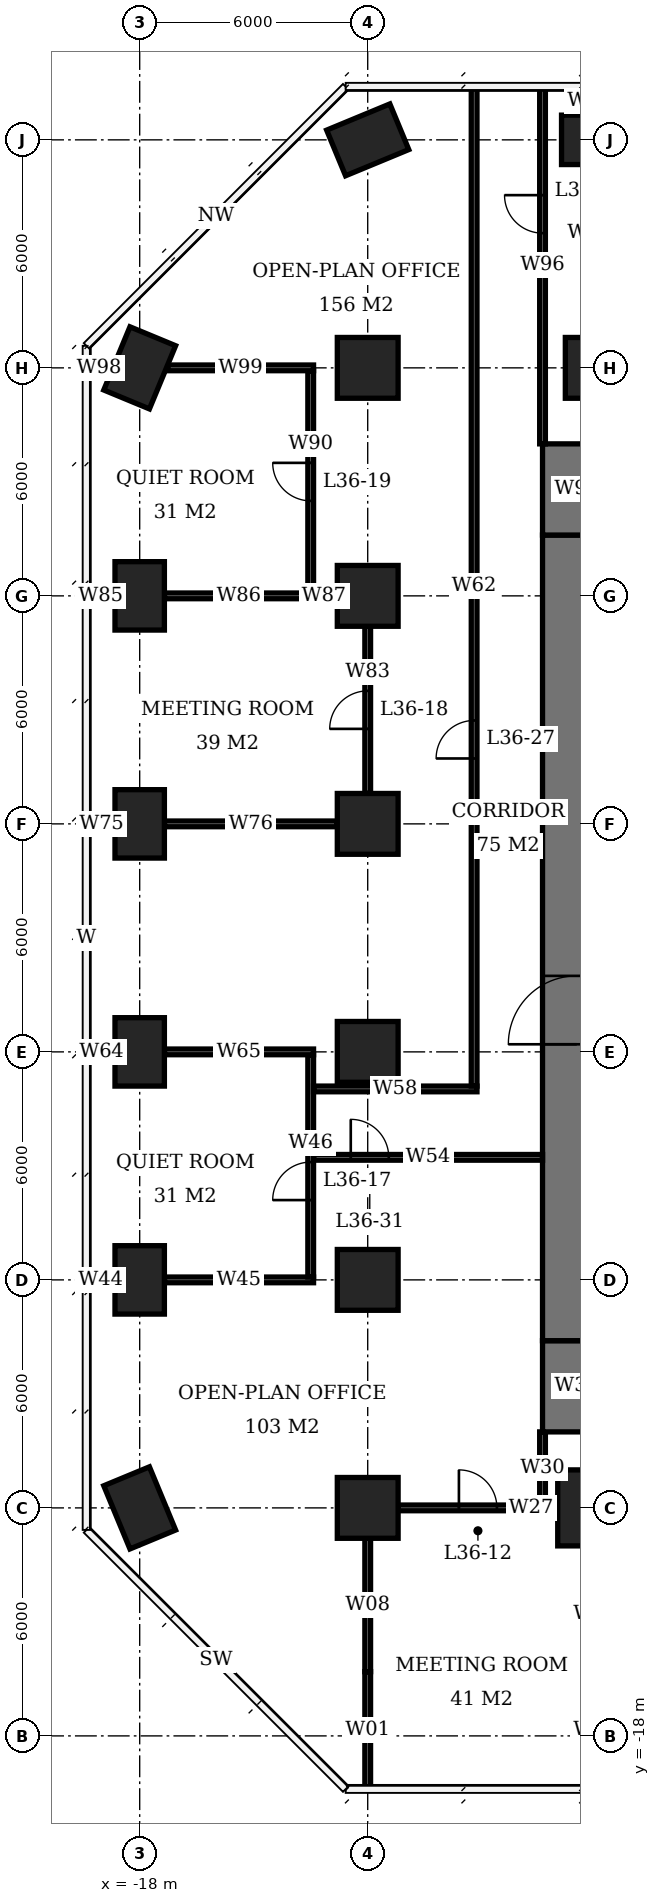
"""IFC4 building model, lengths in metres.
Left out: names, types, materials, properties, quantities, classifications, styles, units other than length and angle.
Written with IfcOpenShell. Run it as: python <this file> out.ifc"""

import sys

from ifc_helpers import new_model, si_unit, direction, frame, frame_2d, origin, origin_2d, place, context, subcontext, project, spatial, rectangle, extrude, element, fill, save


model = new_model("IFC4")
c1 = context("Model", 3, precision=1e-05, world=origin(), true_north=direction((0.0, 1.0)))
c2 = subcontext(c1, "Body", "Model", "MODEL_VIEW")
j1 = project(units=[si_unit("LENGTHUNIT", "METRE"), si_unit("PLANEANGLEUNIT", "RADIAN")], contexts=[c1])
p1 = place(None, origin())
s1 = spatial("IfcSite", under=j1, at=p1, CompositionType="ELEMENT")
p2 = place(p1, origin())
s2 = spatial("IfcBuilding", under=s1, at=p2, CompositionType="ELEMENT")
p3 = place(p2, frame((0.0, 0.0, 148.4)))
s3 = spatial("IfcBuildingStorey", under=s2, at=p3, CompositionType="ELEMENT", Elevation=148.4)
for number, where, z_axis, x_axis in (
    (1, (-18.0, -12.0, 0.0), (0.0, 0.0, 1.0), (-0.383, 0.924, 0.0)),
    (2, (-18.0, -6.0, 0.0), (0.0, 0.0, 1.0), (0.0, 1.0, 0.0)),
    (3, (-18.0, 0.0, 0.0), (0.0, 0.0, 1.0), (0.0, 1.0, 0.0)),
    (4, (-18.0, 6.0, 0.0), (0.0, 0.0, 1.0), (0.0, 1.0, 0.0)),
    (5, (-18.0, 12.0, 0.0), (0.0, 0.0, 1.0), (0.0, 1.0, 0.0)),
    (6, (-18.0, 18.0, 0.0), (0.0, 0.0, 1.0), (0.383, 0.924, 0.0)),
):
    element("IfcColumn", number, at=place(p3, frame(where, z_axis=z_axis, x_axis=x_axis)), inside=s3, PredefinedType="COLUMN", context=c2, shape_type="SweptSolid", body=[
        extrude(rectangle(XDim=1.8, YDim=1.3, at=origin_2d()), origin(), (0.0, 0.0, 1.0), 3.9),
    ])
for number, where, z_axis, x_axis in (
    (7, (-12.0, -12.0, 0.0), (0.0, 0.0, 1.0), (1.0, 0.0, 0.0)),
    (8, (-12.0, -6.0, 0.0), (0.0, 0.0, 1.0), (1.0, 0.0, 0.0)),
    (9, (-12.0, 0.0, 0.0), (0.0, 0.0, 1.0), (1.0, 0.0, 0.0)),
    (10, (-12.0, 6.0, 0.0), (0.0, 0.0, 1.0), (1.0, 0.0, 0.0)),
    (11, (-12.0, 12.0, 0.0), (0.0, 0.0, 1.0), (1.0, 0.0, 0.0)),
    (12, (-12.0, 18.0, 0.0), (0.0, 0.0, 1.0), (1.0, 0.0, 0.0)),
):
    element("IfcColumn", number, at=place(p3, frame(where, z_axis=z_axis, x_axis=x_axis)), inside=s3, PredefinedType="COLUMN", context=c2, shape_type="SweptSolid", body=[
        extrude(rectangle(XDim=1.6, YDim=1.6, at=origin_2d()), origin(), (0.0, 0.0, 1.0), 3.9),
    ])
p4 = place(p3, frame((-12.0, 24.0, 0.0), z_axis=(0.0, 0.0, 1.0), x_axis=(0.923879532511, 0.382683432365, 0.0)))
e13 = element("IfcColumn", 13, at=p4, inside=s3, PredefinedType="COLUMN", context=c2, shape_type="SweptSolid", body=[
    extrude(rectangle(XDim=1.8, YDim=1.3, at=origin_2d()), origin(), (0.0, 0.0, 1.0), 3.9),
])
p5 = place(p3, frame((-6.0, -12.0, 0.0), z_axis=(0.0, 0.0, 1.0), x_axis=(1.0, 0.0, 0.0)))
e14 = element("IfcColumn", 14, at=p5, inside=s3, PredefinedType="COLUMN", context=c2, shape_type="SweptSolid", body=[
    extrude(rectangle(XDim=2.0, YDim=2.0, at=origin_2d()), origin(), (0.0, 0.0, 1.0), 3.9),
])
p6 = place(p3, frame((-6.0, 18.0, 0.0), z_axis=(0.0, 0.0, 1.0), x_axis=(1.0, 0.0, 0.0)))
e15 = element("IfcColumn", 15, at=p6, inside=s3, PredefinedType="COLUMN", context=c2, shape_type="SweptSolid", body=[
    extrude(rectangle(XDim=1.6, YDim=1.6, at=origin_2d()), origin(), (0.0, 0.0, 1.0), 3.9),
])
p7 = place(p3, frame((-6.0, 24.0, 0.0), z_axis=(0.0, 0.0, 1.0), x_axis=(1.0, 0.0, 0.0)))
e16 = element("IfcColumn", 16, at=p7, inside=s3, PredefinedType="COLUMN", context=c2, shape_type="SweptSolid", body=[
    extrude(rectangle(XDim=1.8, YDim=1.3, at=origin_2d()), origin(), (0.0, 0.0, 1.0), 3.9),
])
p8 = place(p3, frame((-6.5, -7.6, 0.0), z_axis=(0.0, 0.0, 1.0), x_axis=(0.0, 1.0, 0.0)))
e17 = element("IfcWall", 17, at=p8, inside=s3, PredefinedType="SHEAR", context=c2, shape_type="SweptSolid", body=[
    extrude(rectangle(XDim=21.2, YDim=1.8, at=frame_2d((10.6, 0.0))), origin(), (0.0, 0.0, 1.0), 3.9),
])
p9 = place(p8, frame((7.8, 0.0, 0.0)))
e18 = element("IfcOpeningElement", 18, at=p9, cuts=e17, PredefinedType="OPENING", context=c2, shape_type="SweptSolid", body=[
    extrude(rectangle(XDim=1.8, YDim=2.4, at=frame_2d((0.9, 1.2))), frame((0.0, 0.91, 0.0), z_axis=(0.0, -1.0, 0.0), x_axis=(1.0, 0.0, 0.0)), (0.0, 0.0, 1.0), 1.82),
])
for number, where, z_axis, x_axis in (
    (19, (-6.5, -10.0, 0.0), (0.0, 0.0, 1.0), (0.0, 1.0, 0.0)),
    (20, (-6.5, 13.6, 0.0), (0.0, 0.0, 1.0), (0.0, 1.0, 0.0)),
):
    element("IfcWall", number, at=place(p3, frame(where, z_axis=z_axis, x_axis=x_axis)), inside=s3, PredefinedType="SHEAR", context=c2, shape_type="SweptSolid", body=[
        extrude(rectangle(XDim=2.4, YDim=1.8, at=frame_2d((1.2, 0.0))), origin(), (0.0, 0.0, 1.0), 3.9),
    ])
p10 = place(p3, frame((-11.2, -12.0, 0.0), z_axis=(0.0, 0.0, 1.0), x_axis=(1.0, 0.0, 0.0)))
e21 = element("IfcWall", 21, at=p10, inside=s3, PredefinedType="PARTITIONING", context=c2, shape_type="SweptSolid", body=[
    extrude(rectangle(XDim=4.2, YDim=0.15, at=frame_2d((2.1, 0.0))), origin(), (0.0, 0.0, 1.0), 3.65),
])
p11 = place(p10, frame((1.6, 0.0, 0.0)))
e22 = element("IfcOpeningElement", 22, at=p11, cuts=e21, PredefinedType="OPENING", context=c2, shape_type="SweptSolid", body=[
    extrude(rectangle(XDim=1.0, YDim=2.1, at=frame_2d((0.5, 1.05))), frame((0.0, 0.085, 0.0), z_axis=(0.0, -1.0, 0.0), x_axis=(1.0, 0.0, 0.0)), (0.0, 0.0, 1.0), 0.17),
])
p12 = place(p3, frame((-19.4, -6.0, 0.0), z_axis=(0.0, 0.0, 1.0), x_axis=(1.0, 0.0, 0.0)))
e23 = element("IfcWall", 23, at=p12, inside=s3, PredefinedType="PARTITIONING", context=c2, shape_type="SweptSolid", body=[
    extrude(rectangle(XDim=0.75, YDim=0.15, at=frame_2d((0.375, 0.0))), origin(), (0.0, 0.0, 1.0), 3.65),
])
p13 = place(p3, frame((-17.35, -6.0, 0.0), z_axis=(0.0, 0.0, 1.0), x_axis=(1.0, 0.0, 0.0)))
e24 = element("IfcWall", 24, at=p13, inside=s3, PredefinedType="PARTITIONING", context=c2, shape_type="SweptSolid", body=[
    extrude(rectangle(XDim=3.925, YDim=0.15, at=frame_2d((1.962, 0.0))), origin(), (0.0, 0.0, 1.0), 3.65),
])
p14 = place(p3, frame((-19.35, 0.0, 0.0), z_axis=(0.0, 0.0, 1.0), x_axis=(1.0, 0.0, 0.0)))
e25 = element("IfcWall", 25, at=p14, inside=s3, PredefinedType="PARTITIONING", context=c2, shape_type="SweptSolid", body=[
    extrude(rectangle(XDim=0.7, YDim=0.15, at=frame_2d((0.35, 0.0))), origin(), (0.0, 0.0, 1.0), 3.65),
])
p15 = place(p3, frame((-17.35, 0.0, 0.0), z_axis=(0.0, 0.0, 1.0), x_axis=(1.0, 0.0, 0.0)))
e26 = element("IfcWall", 26, at=p15, inside=s3, PredefinedType="PARTITIONING", context=c2, shape_type="SweptSolid", body=[
    extrude(rectangle(XDim=3.925, YDim=0.15, at=frame_2d((1.962, 0.0))), origin(), (0.0, 0.0, 1.0), 3.65),
])
p16 = place(p3, frame((-19.35, 6.0, 0.0), z_axis=(0.0, 0.0, 1.0), x_axis=(1.0, 0.0, 0.0)))
e27 = element("IfcWall", 27, at=p16, inside=s3, PredefinedType="PARTITIONING", context=c2, shape_type="SweptSolid", body=[
    extrude(rectangle(XDim=0.7, YDim=0.15, at=frame_2d((0.35, 0.0))), origin(), (0.0, 0.0, 1.0), 3.65),
])
p17 = place(p3, frame((-17.35, 6.0, 0.0), z_axis=(0.0, 0.0, 1.0), x_axis=(1.0, 0.0, 0.0)))
e28 = element("IfcWall", 28, at=p17, inside=s3, PredefinedType="PARTITIONING", context=c2, shape_type="SweptSolid", body=[
    extrude(rectangle(XDim=4.55, YDim=0.15, at=frame_2d((2.275, 0.0))), origin(), (0.0, 0.0, 1.0), 3.65),
])
p18 = place(p3, frame((-19.4, 12.0, 0.0), z_axis=(0.0, 0.0, 1.0), x_axis=(1.0, 0.0, 0.0)))
e29 = element("IfcWall", 29, at=p18, inside=s3, PredefinedType="PARTITIONING", context=c2, shape_type="SweptSolid", body=[
    extrude(rectangle(XDim=0.75, YDim=0.15, at=frame_2d((0.375, 0.0))), origin(), (0.0, 0.0, 1.0), 3.65),
])
p19 = place(p3, frame((-17.35, 12.0, 0.0), z_axis=(0.0, 0.0, 1.0), x_axis=(1.0, 0.0, 0.0)))
e30 = element("IfcWall", 30, at=p19, inside=s3, PredefinedType="PARTITIONING", context=c2, shape_type="SweptSolid", body=[
    extrude(rectangle(XDim=3.925, YDim=0.15, at=frame_2d((1.962, 0.0))), origin(), (0.0, 0.0, 1.0), 3.65),
])
p20 = place(p3, frame((-13.5, 12.0, 0.0), z_axis=(0.0, 0.0, 1.0), x_axis=(1.0, 0.0, 0.0)))
e31 = element("IfcWall", 31, at=p20, inside=s3, PredefinedType="PARTITIONING", context=c2, shape_type="SweptSolid", body=[
    extrude(rectangle(XDim=0.7, YDim=0.15, at=frame_2d((0.35, 0.0))), origin(), (0.0, 0.0, 1.0), 3.65),
])
p21 = place(p3, frame((-19.4, 18.0, 0.0), z_axis=(0.0, 0.0, 1.0), x_axis=(1.0, 0.0, 0.0)))
e32 = element("IfcWall", 32, at=p21, inside=s3, PredefinedType="PARTITIONING", context=c2, shape_type="SweptSolid", body=[
    extrude(rectangle(XDim=0.665, YDim=0.15, at=frame_2d((0.333, 0.0))), origin(), (0.0, 0.0, 1.0), 3.65),
])
p22 = place(p3, frame((-17.265, 18.0, 0.0), z_axis=(0.0, 0.0, 1.0), x_axis=(1.0, 0.0, 0.0)))
e33 = element("IfcWall", 33, at=p22, inside=s3, PredefinedType="PARTITIONING", context=c2, shape_type="SweptSolid", body=[
    extrude(rectangle(XDim=3.84, YDim=0.15, at=frame_2d((1.92, 0.0))), origin(), (0.0, 0.0, 1.0), 3.65),
])
p23 = place(p3, frame((-13.5, -5.925, 0.0), z_axis=(0.0, 0.0, 1.0), x_axis=(0.0, 1.0, 0.0)))
e34 = element("IfcWall", 34, at=p23, inside=s3, PredefinedType="PARTITIONING", context=c2, shape_type="SweptSolid", body=[
    extrude(rectangle(XDim=5.85, YDim=0.15, at=frame_2d((2.925, 0.0))), origin(), (0.0, 0.0, 1.0), 3.65),
])
p24 = place(p23, frame((2.025, 0.0, 0.0)))
e35 = element("IfcOpeningElement", 35, at=p24, cuts=e34, PredefinedType="OPENING", context=c2, shape_type="SweptSolid", body=[
    extrude(rectangle(XDim=1.0, YDim=2.1, at=frame_2d((0.5, 1.05))), frame((0.0, 0.085, 0.0), z_axis=(0.0, -1.0, 0.0), x_axis=(1.0, 0.0, 0.0)), (0.0, 0.0, 1.0), 0.17),
])
p25 = place(p3, frame((-13.5, 12.075, 0.0), z_axis=(0.0, 0.0, 1.0), x_axis=(0.0, 1.0, 0.0)))
e36 = element("IfcWall", 36, at=p25, inside=s3, PredefinedType="PARTITIONING", context=c2, shape_type="SweptSolid", body=[
    extrude(rectangle(XDim=5.85, YDim=0.15, at=frame_2d((2.925, 0.0))), origin(), (0.0, 0.0, 1.0), 3.65),
])
p26 = place(p25, frame((2.425, 0.0, 0.0)))
e37 = element("IfcOpeningElement", 37, at=p26, cuts=e36, PredefinedType="OPENING", context=c2, shape_type="SweptSolid", body=[
    extrude(rectangle(XDim=1.0, YDim=2.1, at=frame_2d((0.5, 1.05))), frame((0.0, 0.085, 0.0), z_axis=(0.0, -1.0, 0.0), x_axis=(1.0, 0.0, 0.0)), (0.0, 0.0, 1.0), 0.17),
])
p27 = place(p3, frame((-12.0, -19.4, 0.0), z_axis=(0.0, 0.0, 1.0), x_axis=(0.0, 1.0, 0.0)))
e38 = element("IfcWall", 38, at=p27, inside=s3, PredefinedType="PARTITIONING", context=c2, shape_type="SweptSolid", body=[
    extrude(rectangle(XDim=3.09, YDim=0.15, at=frame_2d((1.545, 0.0))), origin(), (0.0, 0.0, 1.0), 3.65),
])
p28 = place(p3, frame((-12.0, -16.31, 0.0), z_axis=(0.0, 0.0, 1.0), x_axis=(0.0, 1.0, 0.0)))
e39 = element("IfcWall", 39, at=p28, inside=s3, PredefinedType="PARTITIONING", context=c2, shape_type="SweptSolid", body=[
    extrude(rectangle(XDim=3.51, YDim=0.15, at=frame_2d((1.755, 0.0))), origin(), (0.0, 0.0, 1.0), 2.65),
])
p29 = place(p3, frame((-12.0, 6.8, 0.0), z_axis=(0.0, 0.0, 1.0), x_axis=(0.0, 1.0, 0.0)))
e40 = element("IfcWall", 40, at=p29, inside=s3, PredefinedType="PARTITIONING", context=c2, shape_type="SweptSolid", body=[
    extrude(rectangle(XDim=4.4, YDim=0.15, at=frame_2d((2.2, 0.0))), origin(), (0.0, 0.0, 1.0), 3.65),
])
p30 = place(p29, frame((1.7, 0.0, 0.0)))
e41 = element("IfcOpeningElement", 41, at=p30, cuts=e40, PredefinedType="OPENING", context=c2, shape_type="SweptSolid", body=[
    extrude(rectangle(XDim=1.0, YDim=2.1, at=frame_2d((0.5, 1.05))), frame((0.0, 0.085, 0.0), z_axis=(0.0, -1.0, 0.0), x_axis=(1.0, 0.0, 0.0)), (0.0, 0.0, 1.0), 0.17),
])
p31 = place(p3, frame((-13.425, -2.775, 0.0), z_axis=(0.0, 0.0, 1.0), x_axis=(1.0, 0.0, 0.0)))
e42 = element("IfcWall", 42, at=p31, inside=s3, PredefinedType="PARTITIONING", context=c2, shape_type="SweptSolid", body=[
    extrude(rectangle(XDim=6.025, YDim=0.15, at=frame_2d((3.013, 0.0))), origin(), (0.0, 0.0, 1.0), 3.65),
])
p32 = place(p31, frame((0.979, 0.0, 0.0)))
e43 = element("IfcOpeningElement", 43, at=p32, cuts=e42, PredefinedType="OPENING", context=c2, shape_type="SweptSolid", body=[
    extrude(rectangle(XDim=1.0, YDim=2.1, at=frame_2d((0.5, 1.05))), frame((0.0, 0.085, 0.0), z_axis=(0.0, -1.0, 0.0), x_axis=(1.0, 0.0, 0.0)), (0.0, 0.0, 1.0), 0.17),
])
p33 = place(p3, frame((-13.425, -0.975, 0.0), z_axis=(0.0, 0.0, 1.0), x_axis=(1.0, 0.0, 0.0)))
e44 = element("IfcWall", 44, at=p33, inside=s3, PredefinedType="PARTITIONING", context=c2, shape_type="SweptSolid", body=[
    extrude(rectangle(XDim=4.3, YDim=0.15, at=frame_2d((2.15, 0.0))), origin(), (0.0, 0.0, 1.0), 3.65),
])
p34 = place(p3, frame((-9.2, -0.9, 0.0), z_axis=(0.0, 0.0, 1.0), x_axis=(0.0, 1.0, 0.0)))
e45 = element("IfcWall", 45, at=p34, inside=s3, PredefinedType="PARTITIONING", context=c2, shape_type="SweptSolid", body=[
    extrude(rectangle(XDim=26.3, YDim=0.15, at=frame_2d((13.15, 0.0))), origin(), (0.0, 0.0, 1.0), 3.65),
])
p35 = place(p34, frame((8.621, 0.0, 0.0)))
e46 = element("IfcOpeningElement", 46, at=p35, cuts=e45, PredefinedType="OPENING", context=c2, shape_type="SweptSolid", body=[
    extrude(rectangle(XDim=1.0, YDim=2.1, at=frame_2d((0.5, 1.05))), frame((0.0, 0.085, 0.0), z_axis=(0.0, -1.0, 0.0), x_axis=(1.0, 0.0, 0.0)), (0.0, 0.0, 1.0), 0.17),
])
p36 = place(p3, frame((-7.4, -11.925, 0.0), z_axis=(0.0, 0.0, 1.0), x_axis=(0.0, 1.0, 0.0)))
e47 = element("IfcWall", 47, at=p36, inside=s3, PredefinedType="PARTITIONING", context=c2, shape_type="SweptSolid", body=[
    extrude(rectangle(XDim=1.925, YDim=0.15, at=frame_2d((0.962, 0.0))), origin(), (0.0, 0.0, 1.0), 3.65),
])
p37 = place(p3, frame((-7.4, 16.0, 0.0), z_axis=(0.0, 0.0, 1.0), x_axis=(0.0, 1.0, 0.0)))
e48 = element("IfcWall", 48, at=p37, inside=s3, PredefinedType="PARTITIONING", context=c2, shape_type="SweptSolid", body=[
    extrude(rectangle(XDim=9.4, YDim=0.15, at=frame_2d((4.7, 0.0))), origin(), (0.0, 0.0, 1.0), 3.65),
])
p38 = place(p37, frame((5.545, 0.0, 0.0)))
e49 = element("IfcOpeningElement", 49, at=p38, cuts=e48, PredefinedType="OPENING", context=c2, shape_type="SweptSolid", body=[
    extrude(rectangle(XDim=1.0, YDim=2.1, at=frame_2d((0.5, 1.05))), frame((0.0, 0.085, 0.0), z_axis=(0.0, -1.0, 0.0), x_axis=(1.0, 0.0, 0.0)), (0.0, 0.0, 1.0), 0.17),
])
p39 = place(p9, origin())
e50 = element("IfcDoor", 50, at=p39, inside=s3, OperationType="DOUBLE_DOOR_SINGLE_SWING", PredefinedType="DOOR", context=c2, shape_type="SweptSolid", body=[
    extrude(rectangle(XDim=1.8, YDim=2.4, at=frame_2d((0.9, 1.2))), frame((0.0, 0.025, 0.0), z_axis=(0.0, -1.0, 0.0), x_axis=(1.0, 0.0, 0.0)), (0.0, 0.0, 1.0), 0.05),
])
fill(e18, e50)
p40 = place(p11, origin())
e51 = element("IfcDoor", 51, at=p40, inside=s3, OperationType="SINGLE_SWING_LEFT", PredefinedType="DOOR", context=c2, shape_type="SweptSolid", body=[
    extrude(rectangle(XDim=1.0, YDim=2.1, at=frame_2d((0.5, 1.05))), frame((0.0, 0.025, 0.0), z_axis=(0.0, -1.0, 0.0), x_axis=(1.0, 0.0, 0.0)), (0.0, 0.0, 1.0), 0.05),
])
fill(e22, e51)
p41 = place(p24, origin())
e52 = element("IfcDoor", 52, at=p41, inside=s3, OperationType="SINGLE_SWING_LEFT", PredefinedType="DOOR", context=c2, shape_type="SweptSolid", body=[
    extrude(rectangle(XDim=1.0, YDim=2.1, at=frame_2d((0.5, 1.05))), frame((0.0, 0.025, 0.0), z_axis=(0.0, -1.0, 0.0), x_axis=(1.0, 0.0, 0.0)), (0.0, 0.0, 1.0), 0.05),
])
fill(e35, e52)
p42 = place(p30, origin())
e53 = element("IfcDoor", 53, at=p42, inside=s3, OperationType="SINGLE_SWING_LEFT", PredefinedType="DOOR", context=c2, shape_type="SweptSolid", body=[
    extrude(rectangle(XDim=1.0, YDim=2.1, at=frame_2d((0.5, 1.05))), frame((0.0, 0.025, 0.0), z_axis=(0.0, -1.0, 0.0), x_axis=(1.0, 0.0, 0.0)), (0.0, 0.0, 1.0), 0.05),
])
fill(e41, e53)
p43 = place(p26, origin())
e54 = element("IfcDoor", 54, at=p43, inside=s3, OperationType="SINGLE_SWING_RIGHT", PredefinedType="DOOR", context=c2, shape_type="SweptSolid", body=[
    extrude(rectangle(XDim=1.0, YDim=2.1, at=frame_2d((0.5, 1.05))), frame((0.0, 0.025, 0.0), z_axis=(0.0, -1.0, 0.0), x_axis=(1.0, 0.0, 0.0)), (0.0, 0.0, 1.0), 0.05),
])
fill(e37, e54)
p44 = place(p35, origin())
e55 = element("IfcDoor", 55, at=p44, inside=s3, OperationType="SINGLE_SWING_LEFT", PredefinedType="DOOR", context=c2, shape_type="SweptSolid", body=[
    extrude(rectangle(XDim=1.0, YDim=2.1, at=frame_2d((0.5, 1.05))), frame((0.0, 0.025, 0.0), z_axis=(0.0, -1.0, 0.0), x_axis=(1.0, 0.0, 0.0)), (0.0, 0.0, 1.0), 0.05),
])
fill(e46, e55)
p45 = place(p38, origin())
e56 = element("IfcDoor", 56, at=p45, inside=s3, OperationType="SINGLE_SWING_RIGHT", PredefinedType="DOOR", context=c2, shape_type="SweptSolid", body=[
    extrude(rectangle(XDim=1.0, YDim=2.1, at=frame_2d((0.5, 1.05))), frame((0.0, 0.025, 0.0), z_axis=(0.0, -1.0, 0.0), x_axis=(1.0, 0.0, 0.0)), (0.0, 0.0, 1.0), 0.05),
])
fill(e49, e56)
p46 = place(p32, origin())
e57 = element("IfcDoor", 57, at=p46, inside=s3, OperationType="SINGLE_SWING_LEFT", PredefinedType="DOOR", context=c2, shape_type="SweptSolid", body=[
    extrude(rectangle(XDim=1.0, YDim=2.1, at=frame_2d((0.5, 1.05))), frame((0.0, 0.025, 0.0), z_axis=(0.0, -1.0, 0.0), x_axis=(1.0, 0.0, 0.0)), (0.0, 0.0, 1.0), 0.05),
])
fill(e43, e57)
save(model, sys.argv[1])
